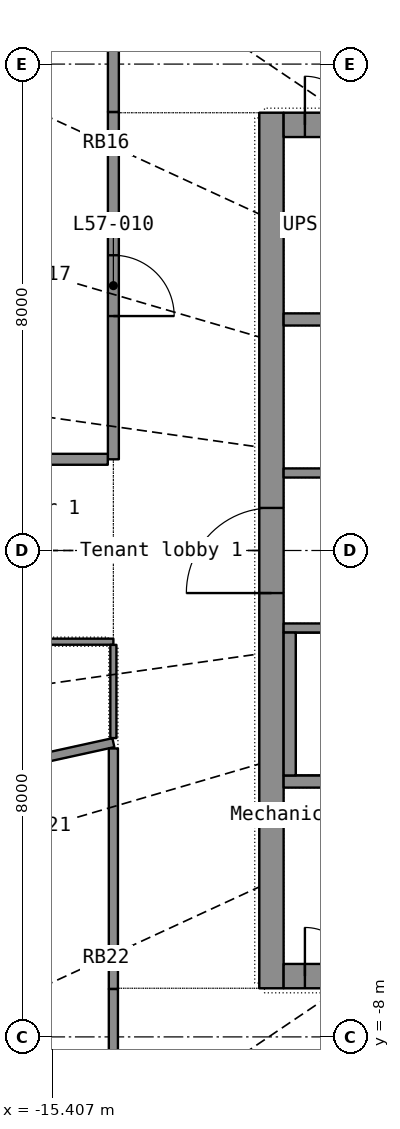
"""IFC4 building model, lengths in metres.
Left out: names, types, materials, properties, quantities, classifications, styles, units other than length and angle.
Written with IfcOpenShell. Run it as: python <this file> out.ifc"""

import sys

from ifc_helpers import new_model, si_unit, direction, frame, frame_2d, origin, place, context, subcontext, project, spatial, rectangle, extrude, element, fill, save


model = new_model("IFC4")
c1 = context("Model", 3, precision=1e-05, world=origin(), true_north=direction((0.0, 1.0)))
c2 = subcontext(c1, "Body", "Model", "MODEL_VIEW")
j1 = project(units=[si_unit("LENGTHUNIT", "METRE"), si_unit("PLANEANGLEUNIT", "RADIAN")], contexts=[c1])
p1 = place(None, origin())
s1 = spatial("IfcSite", under=j1, at=p1, CompositionType="ELEMENT")
p2 = place(p1, origin())
s2 = spatial("IfcBuilding", under=s1, at=p2, CompositionType="ELEMENT")
p3 = place(p2, frame((0.0, 0.0, 235.6)))
s3 = spatial("IfcBuildingStorey", under=s2, at=p3, CompositionType="ELEMENT", Elevation=235.6)
p4 = place(p3, frame((-11.8, -7.2, 0.0), z_axis=(0.0, 0.0, 1.0), x_axis=(0.0, 1.0, 0.0)))
e1 = element("IfcWall", 1, at=p4, inside=s3, PredefinedType="SHEAR", context=c2, shape_type="SweptSolid", body=[
    extrude(rectangle(XDim=14.4, YDim=0.4, at=frame_2d((7.2, 0.0))), origin(), (0.0, 0.0, 1.0), 3.3),
])
p5 = place(p4, frame((6.5, 0.0, 0.0)))
e2 = element("IfcOpeningElement", 2, at=p5, cuts=e1, PredefinedType="OPENING", context=c2, shape_type="SweptSolid", body=[
    extrude(rectangle(XDim=1.4, YDim=2.2, at=frame_2d((0.7, 1.1))), frame((0.0, 0.21, 0.0), z_axis=(0.0, -1.0, 0.0), x_axis=(1.0, 0.0, 0.0)), (0.0, 0.0, 1.0), 0.42),
])
p6 = place(p3, frame((-11.6, -7.0, 0.0), z_axis=(0.0, 0.0, 1.0), x_axis=(1.0, 0.0, 0.0)))
e3 = element("IfcWall", 3, at=p6, inside=s3, PredefinedType="SHEAR", context=c2, shape_type="SweptSolid", body=[
    extrude(rectangle(XDim=23.2, YDim=0.4, at=frame_2d((11.6, 0.0))), origin(), (0.0, 0.0, 1.0), 3.3),
])
p7 = place(p6, frame((20.05, 0.0, 0.0)))
e4 = element("IfcOpeningElement", 4, at=p7, cuts=e3, PredefinedType="OPENING", context=c2, shape_type="SweptSolid", body=[
    extrude(rectangle(XDim=1.1, YDim=2.2, at=frame_2d((0.55, 1.1))), frame((0.0, 0.21, 0.0), z_axis=(0.0, -1.0, 0.0), x_axis=(1.0, 0.0, 0.0)), (0.0, 0.0, 1.0), 0.42),
])
p8 = place(p6, frame((3.15, 0.0, 0.0)))
e5 = element("IfcOpeningElement", 5, at=p8, cuts=e3, PredefinedType="OPENING", context=c2, shape_type="SweptSolid", body=[
    extrude(rectangle(XDim=0.9, YDim=2.1, at=frame_2d((0.45, 1.05))), frame((0.0, 0.21, 0.0), z_axis=(0.0, -1.0, 0.0), x_axis=(1.0, 0.0, 0.0)), (0.0, 0.0, 1.0), 0.42),
])
p9 = place(p6, frame((7.15, 0.0, 0.0)))
e6 = element("IfcOpeningElement", 6, at=p9, cuts=e3, PredefinedType="OPENING", context=c2, shape_type="SweptSolid", body=[
    extrude(rectangle(XDim=0.9, YDim=2.1, at=frame_2d((0.45, 1.05))), frame((0.0, 0.21, 0.0), z_axis=(0.0, -1.0, 0.0), x_axis=(1.0, 0.0, 0.0)), (0.0, 0.0, 1.0), 0.42),
])
p10 = place(p6, frame((11.15, 0.0, 0.0)))
e7 = element("IfcOpeningElement", 7, at=p10, cuts=e3, PredefinedType="OPENING", context=c2, shape_type="SweptSolid", body=[
    extrude(rectangle(XDim=0.9, YDim=2.1, at=frame_2d((0.45, 1.05))), frame((0.0, 0.21, 0.0), z_axis=(0.0, -1.0, 0.0), x_axis=(1.0, 0.0, 0.0)), (0.0, 0.0, 1.0), 0.42),
])
p11 = place(p6, frame((16.15, 0.0, 0.0)))
e8 = element("IfcOpeningElement", 8, at=p11, cuts=e3, PredefinedType="OPENING", context=c2, shape_type="SweptSolid", body=[
    extrude(rectangle(XDim=0.9, YDim=2.1, at=frame_2d((0.45, 1.05))), frame((0.0, 0.21, 0.0), z_axis=(0.0, -1.0, 0.0), x_axis=(1.0, 0.0, 0.0)), (0.0, 0.0, 1.0), 0.42),
])
p12 = place(p6, frame((0.35, 0.0, 0.0)))
e9 = element("IfcOpeningElement", 9, at=p12, cuts=e3, PredefinedType="OPENING", context=c2, shape_type="SweptSolid", body=[
    extrude(rectangle(XDim=0.8, YDim=2.05, at=frame_2d((0.4, 1.025))), frame((0.0, 0.21, 0.0), z_axis=(0.0, -1.0, 0.0), x_axis=(1.0, 0.0, 0.0)), (0.0, 0.0, 1.0), 0.42),
])
p13 = place(p6, frame((22.05, 0.0, 0.0)))
e10 = element("IfcOpeningElement", 10, at=p13, cuts=e3, PredefinedType="OPENING", context=c2, shape_type="SweptSolid", body=[
    extrude(rectangle(XDim=0.8, YDim=2.05, at=frame_2d((0.4, 1.025))), frame((0.0, 0.21, 0.0), z_axis=(0.0, -1.0, 0.0), x_axis=(1.0, 0.0, 0.0)), (0.0, 0.0, 1.0), 0.42),
])
p14 = place(p3, frame((-11.6, 7.0, 0.0), z_axis=(0.0, 0.0, 1.0), x_axis=(1.0, 0.0, 0.0)))
e11 = element("IfcWall", 11, at=p14, inside=s3, PredefinedType="SHEAR", context=c2, shape_type="SweptSolid", body=[
    extrude(rectangle(XDim=23.2, YDim=0.4, at=frame_2d((11.6, 0.0))), origin(), (0.0, 0.0, 1.0), 3.3),
])
p15 = place(p14, frame((2.05, 0.0, 0.0)))
e12 = element("IfcOpeningElement", 12, at=p15, cuts=e11, PredefinedType="OPENING", context=c2, shape_type="SweptSolid", body=[
    extrude(rectangle(XDim=1.1, YDim=2.2, at=frame_2d((0.55, 1.1))), frame((0.0, 0.21, 0.0), z_axis=(0.0, -1.0, 0.0), x_axis=(1.0, 0.0, 0.0)), (0.0, 0.0, 1.0), 0.42),
])
p16 = place(p14, frame((6.05, 0.0, 0.0)))
e13 = element("IfcOpeningElement", 13, at=p16, cuts=e11, PredefinedType="OPENING", context=c2, shape_type="SweptSolid", body=[
    extrude(rectangle(XDim=1.1, YDim=2.2, at=frame_2d((0.55, 1.1))), frame((0.0, 0.21, 0.0), z_axis=(0.0, -1.0, 0.0), x_axis=(1.0, 0.0, 0.0)), (0.0, 0.0, 1.0), 0.42),
])
p17 = place(p14, frame((8.05, 0.0, 0.0)))
e14 = element("IfcOpeningElement", 14, at=p17, cuts=e11, PredefinedType="OPENING", context=c2, shape_type="SweptSolid", body=[
    extrude(rectangle(XDim=1.1, YDim=2.2, at=frame_2d((0.55, 1.1))), frame((0.0, 0.21, 0.0), z_axis=(0.0, -1.0, 0.0), x_axis=(1.0, 0.0, 0.0)), (0.0, 0.0, 1.0), 0.42),
])
p18 = place(p14, frame((10.05, 0.0, 0.0)))
e15 = element("IfcOpeningElement", 15, at=p18, cuts=e11, PredefinedType="OPENING", context=c2, shape_type="SweptSolid", body=[
    extrude(rectangle(XDim=1.1, YDim=2.2, at=frame_2d((0.55, 1.1))), frame((0.0, 0.21, 0.0), z_axis=(0.0, -1.0, 0.0), x_axis=(1.0, 0.0, 0.0)), (0.0, 0.0, 1.0), 0.42),
])
p19 = place(p14, frame((12.05, 0.0, 0.0)))
e16 = element("IfcOpeningElement", 16, at=p19, cuts=e11, PredefinedType="OPENING", context=c2, shape_type="SweptSolid", body=[
    extrude(rectangle(XDim=1.1, YDim=2.2, at=frame_2d((0.55, 1.1))), frame((0.0, 0.21, 0.0), z_axis=(0.0, -1.0, 0.0), x_axis=(1.0, 0.0, 0.0)), (0.0, 0.0, 1.0), 0.42),
])
p20 = place(p14, frame((14.05, 0.0, 0.0)))
e17 = element("IfcOpeningElement", 17, at=p20, cuts=e11, PredefinedType="OPENING", context=c2, shape_type="SweptSolid", body=[
    extrude(rectangle(XDim=1.1, YDim=2.2, at=frame_2d((0.55, 1.1))), frame((0.0, 0.21, 0.0), z_axis=(0.0, -1.0, 0.0), x_axis=(1.0, 0.0, 0.0)), (0.0, 0.0, 1.0), 0.42),
])
p21 = place(p14, frame((16.05, 0.0, 0.0)))
e18 = element("IfcOpeningElement", 18, at=p21, cuts=e11, PredefinedType="OPENING", context=c2, shape_type="SweptSolid", body=[
    extrude(rectangle(XDim=1.1, YDim=2.2, at=frame_2d((0.55, 1.1))), frame((0.0, 0.21, 0.0), z_axis=(0.0, -1.0, 0.0), x_axis=(1.0, 0.0, 0.0)), (0.0, 0.0, 1.0), 0.42),
])
p22 = place(p14, frame((18.05, 0.0, 0.0)))
e19 = element("IfcOpeningElement", 19, at=p22, cuts=e11, PredefinedType="OPENING", context=c2, shape_type="SweptSolid", body=[
    extrude(rectangle(XDim=1.1, YDim=2.2, at=frame_2d((0.55, 1.1))), frame((0.0, 0.21, 0.0), z_axis=(0.0, -1.0, 0.0), x_axis=(1.0, 0.0, 0.0)), (0.0, 0.0, 1.0), 0.42),
])
p23 = place(p14, frame((20.05, 0.0, 0.0)))
e20 = element("IfcOpeningElement", 20, at=p23, cuts=e11, PredefinedType="OPENING", context=c2, shape_type="SweptSolid", body=[
    extrude(rectangle(XDim=1.1, YDim=2.2, at=frame_2d((0.55, 1.1))), frame((0.0, 0.21, 0.0), z_axis=(0.0, -1.0, 0.0), x_axis=(1.0, 0.0, 0.0)), (0.0, 0.0, 1.0), 0.42),
])
p24 = place(p14, frame((4.15, 0.0, 0.0)))
e21 = element("IfcOpeningElement", 21, at=p24, cuts=e11, PredefinedType="OPENING", context=c2, shape_type="SweptSolid", body=[
    extrude(rectangle(XDim=0.9, YDim=2.1, at=frame_2d((0.45, 1.05))), frame((0.0, 0.21, 0.0), z_axis=(0.0, -1.0, 0.0), x_axis=(1.0, 0.0, 0.0)), (0.0, 0.0, 1.0), 0.42),
])
p25 = place(p14, frame((0.35, 0.0, 0.0)))
e22 = element("IfcOpeningElement", 22, at=p25, cuts=e11, PredefinedType="OPENING", context=c2, shape_type="SweptSolid", body=[
    extrude(rectangle(XDim=0.8, YDim=2.05, at=frame_2d((0.4, 1.025))), frame((0.0, 0.21, 0.0), z_axis=(0.0, -1.0, 0.0), x_axis=(1.0, 0.0, 0.0)), (0.0, 0.0, 1.0), 0.42),
])
p26 = place(p14, frame((22.05, 0.0, 0.0)))
e23 = element("IfcOpeningElement", 23, at=p26, cuts=e11, PredefinedType="OPENING", context=c2, shape_type="SweptSolid", body=[
    extrude(rectangle(XDim=0.8, YDim=2.05, at=frame_2d((0.4, 1.025))), frame((0.0, 0.21, 0.0), z_axis=(0.0, -1.0, 0.0), x_axis=(1.0, 0.0, 0.0)), (0.0, 0.0, 1.0), 0.42),
])
for number, where, z_axis, x_axis in (
    (24, (-11.6, -3.8, 0.0), (0.0, 0.0, 1.0), (1.0, 0.0, 0.0)),
    (25, (-11.6, 3.8, 0.0), (0.0, 0.0, 1.0), (1.0, 0.0, 0.0)),
):
    element("IfcWall", number, at=place(p3, frame(where, z_axis=z_axis, x_axis=x_axis)), inside=s3, PredefinedType="SHEAR", context=c2, shape_type="SweptSolid", body=[
        extrude(rectangle(XDim=23.2, YDim=0.2, at=frame_2d((11.6, 0.0))), origin(), (0.0, 0.0, 1.0), 3.3),
    ])
p27 = place(p3, frame((-11.6, -1.275, 0.0), z_axis=(0.0, 0.0, 1.0), x_axis=(1.0, 0.0, 0.0)))
e26 = element("IfcWall", 26, at=p27, inside=s3, PredefinedType="SHEAR", context=c2, shape_type="SweptSolid", body=[
    extrude(rectangle(XDim=8.6, YDim=0.15, at=frame_2d((4.3, 0.0))), origin(), (0.0, 0.0, 1.0), 3.3),
])
p28 = place(p27, frame((5.45, 0.0, 0.0)))
e27 = element("IfcOpeningElement", 27, at=p28, cuts=e26, PredefinedType="OPENING", context=c2, shape_type="SweptSolid", body=[
    extrude(rectangle(XDim=1.1, YDim=2.15, at=frame_2d((0.55, 1.075))), frame((0.0, 0.085, 0.0), z_axis=(0.0, -1.0, 0.0), x_axis=(1.0, 0.0, 0.0)), (0.0, 0.0, 1.0), 0.17),
])
p29 = place(p27, frame((7.25, 0.0, 0.0)))
e28 = element("IfcOpeningElement", 28, at=p29, cuts=e26, PredefinedType="OPENING", context=c2, shape_type="SweptSolid", body=[
    extrude(rectangle(XDim=0.9, YDim=2.1, at=frame_2d((0.45, 1.05))), frame((0.0, 0.085, 0.0), z_axis=(0.0, -1.0, 0.0), x_axis=(1.0, 0.0, 0.0)), (0.0, 0.0, 1.0), 0.17),
])
p30 = place(p3, frame((-11.6, 1.275, 0.0), z_axis=(0.0, 0.0, 1.0), x_axis=(1.0, 0.0, 0.0)))
e29 = element("IfcWall", 29, at=p30, inside=s3, PredefinedType="PARTITIONING", context=c2, shape_type="SweptSolid", body=[
    extrude(rectangle(XDim=8.6, YDim=0.15, at=frame_2d((4.3, 0.0))), origin(), (0.0, 0.0, 1.0), 3.3),
])
p31 = place(p30, frame((1.318, 0.0, 0.0)))
e30 = element("IfcOpeningElement", 30, at=p31, cuts=e29, PredefinedType="OPENING", context=c2, shape_type="SweptSolid", body=[
    extrude(rectangle(XDim=0.85, YDim=2.1, at=frame_2d((0.425, 1.05))), frame((0.0, 0.085, 0.0), z_axis=(0.0, -1.0, 0.0), x_axis=(1.0, 0.0, 0.0)), (0.0, 0.0, 1.0), 0.17),
])
p32 = place(p30, frame((4.456, 0.0, 0.0)))
e31 = element("IfcOpeningElement", 31, at=p32, cuts=e29, PredefinedType="OPENING", context=c2, shape_type="SweptSolid", body=[
    extrude(rectangle(XDim=0.85, YDim=2.1, at=frame_2d((0.425, 1.05))), frame((0.0, 0.085, 0.0), z_axis=(0.0, -1.0, 0.0), x_axis=(1.0, 0.0, 0.0)), (0.0, 0.0, 1.0), 0.17),
])
p33 = place(p30, frame((6.988, 0.0, 0.0)))
e32 = element("IfcOpeningElement", 32, at=p33, cuts=e29, PredefinedType="OPENING", context=c2, shape_type="SweptSolid", body=[
    extrude(rectangle(XDim=0.9, YDim=2.1, at=frame_2d((0.45, 1.05))), frame((0.0, 0.085, 0.0), z_axis=(0.0, -1.0, 0.0), x_axis=(1.0, 0.0, 0.0)), (0.0, 0.0, 1.0), 0.17),
])
p34 = place(p3, frame((-11.5, -3.7, 0.0), z_axis=(0.0, 0.0, 1.0), x_axis=(0.0, 1.0, 0.0)))
e33 = element("IfcWall", 33, at=p34, inside=s3, PredefinedType="SHEAR", context=c2, shape_type="SweptSolid", body=[
    extrude(rectangle(XDim=2.35, YDim=0.2, at=frame_2d((1.175, 0.0))), origin(), (0.0, 0.0, 1.0), 3.3),
])
p35 = place(p3, frame((-14.4, -3.161, 0.0), z_axis=(0.0, 0.0, 1.0), x_axis=(-0.976754355, -0.214361681, 0.0)))
e34 = element("IfcWall", 34, at=p35, inside=s3, PredefinedType="PARTITIONING", context=c2, shape_type="SweptSolid", body=[
    extrude(rectangle(XDim=6.352, YDim=0.15, at=frame_2d((3.176, 0.0))), origin(), (0.0, 0.0, 1.0), 2.4),
])
p36 = place(p3, frame((-14.4, 7.212, 0.0), z_axis=(0.0, 0.0, 1.0), x_axis=(0.0, -1.0, 0.0)))
e35 = element("IfcWall", 35, at=p36, inside=s3, PredefinedType="PARTITIONING", context=c2, shape_type="SweptSolid", body=[
    extrude(rectangle(XDim=5.712, YDim=0.18, at=frame_2d((2.856, 0.0))), origin(), (0.0, 0.0, 1.0), 2.4),
])
p37 = place(p36, frame((2.356, 0.0, 0.0)))
e36 = element("IfcOpeningElement", 36, at=p37, cuts=e35, PredefinedType="OPENING", context=c2, shape_type="SweptSolid", body=[
    extrude(rectangle(XDim=1.0, YDim=2.1, at=frame_2d((0.5, 1.05))), frame((0.0, 0.1, 0.0), z_axis=(0.0, -1.0, 0.0), x_axis=(1.0, 0.0, 0.0)), (0.0, 0.0, 1.0), 0.2),
])
p38 = place(p3, frame((-18.722, -1.5, 0.0), z_axis=(0.0, 0.0, 1.0), x_axis=(1.0, 0.0, 0.0)))
e37 = element("IfcWall", 37, at=p38, inside=s3, PredefinedType="PARTITIONING", context=c2, shape_type="SweptSolid", body=[
    extrude(rectangle(XDim=4.322, YDim=0.1, at=frame_2d((2.161, 0.0))), origin(), (0.0, 0.0, 1.0), 2.4),
])
p39 = place(p38, frame((1.686, 0.0, 0.0)))
e38 = element("IfcOpeningElement", 38, at=p39, cuts=e37, PredefinedType="OPENING", context=c2, shape_type="SweptSolid", body=[
    extrude(rectangle(XDim=0.95, YDim=2.15, at=frame_2d((0.475, 1.075))), frame((0.0, 0.06, 0.0), z_axis=(0.0, -1.0, 0.0), x_axis=(1.0, 0.0, 0.0)), (0.0, 0.0, 1.0), 0.12),
])
p40 = place(p3, frame((-14.492, 1.5, 0.0), z_axis=(0.0, 0.0, 1.0), x_axis=(-1.0, 0.0, 0.0)))
e39 = element("IfcWall", 39, at=p40, inside=s3, PredefinedType="PARTITIONING", context=c2, shape_type="SweptSolid", body=[
    extrude(rectangle(XDim=4.23, YDim=0.18, at=frame_2d((2.115, 0.0))), origin(), (0.0, 0.0, 1.0), 2.4),
])
p41 = place(p3, frame((-14.4, -3.256, 0.0), z_axis=(0.0, 0.0, 1.0), x_axis=(0.0, -1.0, 0.0)))
e40 = element("IfcWall", 40, at=p41, inside=s3, PredefinedType="PARTITIONING", context=c2, shape_type="SweptSolid", body=[
    extrude(rectangle(XDim=3.956, YDim=0.15, at=frame_2d((1.978, 0.0))), origin(), (0.0, 0.0, 1.0), 2.4),
])
p42 = place(p3, frame((-14.4, -7.213, 0.0), z_axis=(0.0, 0.0, 1.0), x_axis=(0.0, -1.0, 0.0)))
e41 = element("IfcWall", 41, at=p42, inside=s3, PredefinedType="PARTITIONING", context=c2, shape_type="SweptSolid", body=[
    extrude(rectangle(XDim=2.31, YDim=0.15, at=frame_2d((1.155, 0.0))), origin(), (0.0, 0.0, 1.0), 2.4),
])
p43 = place(p3, frame((-14.4, 9.508, 0.0), z_axis=(0.0, 0.0, 1.0), x_axis=(0.0, -1.0, 0.0)))
e42 = element("IfcWall", 42, at=p43, inside=s3, PredefinedType="PARTITIONING", context=c2, shape_type="SweptSolid", body=[
    extrude(rectangle(XDim=2.295, YDim=0.18, at=frame_2d((1.147, 0.0))), origin(), (0.0, 0.0, 1.0), 2.4),
])
p44 = place(p3, frame((-14.4, -1.552, 0.0), z_axis=(0.0, 0.0, 1.0), x_axis=(0.0, -1.0, 0.0)))
e43 = element("IfcWall", 43, at=p44, inside=s3, PredefinedType="PARTITIONING", context=c2, shape_type="SweptSolid", body=[
    extrude(rectangle(XDim=1.533, YDim=0.1, at=frame_2d((0.767, 0.0))), origin(), (0.0, 0.0, 1.0), 2.4),
])
p45 = place(p12, origin())
e44 = element("IfcDoor", 44, at=p45, inside=s3, OperationType="SINGLE_SWING_LEFT", PredefinedType="DOOR", context=c2, shape_type="SweptSolid", body=[
    extrude(rectangle(XDim=0.8, YDim=2.05, at=frame_2d((0.4, 1.025))), frame((0.0, 0.025, 0.0), z_axis=(0.0, -1.0, 0.0), x_axis=(1.0, 0.0, 0.0)), (0.0, 0.0, 1.0), 0.05),
])
fill(e9, e44)
p46 = place(p25, origin())
e45 = element("IfcDoor", 45, at=p46, inside=s3, OperationType="SINGLE_SWING_LEFT", PredefinedType="DOOR", context=c2, shape_type="SweptSolid", body=[
    extrude(rectangle(XDim=0.8, YDim=2.05, at=frame_2d((0.4, 1.025))), frame((0.0, 0.025, 0.0), z_axis=(0.0, -1.0, 0.0), x_axis=(1.0, 0.0, 0.0)), (0.0, 0.0, 1.0), 0.05),
])
fill(e22, e45)
p47 = place(p5, origin())
e46 = element("IfcDoor", 46, at=p47, inside=s3, OperationType="DOUBLE_DOOR_SINGLE_SWING", PredefinedType="DOOR", context=c2, shape_type="SweptSolid", body=[
    extrude(rectangle(XDim=1.4, YDim=2.2, at=frame_2d((0.7, 1.1))), frame((0.0, 0.025, 0.0), z_axis=(0.0, -1.0, 0.0), x_axis=(1.0, 0.0, 0.0)), (0.0, 0.0, 1.0), 0.05),
])
fill(e2, e46)
p48 = place(p37, origin())
e47 = element("IfcDoor", 47, at=p48, inside=s3, OperationType="SINGLE_SWING_RIGHT", PredefinedType="DOOR", context=c2, shape_type="SweptSolid", body=[
    extrude(rectangle(XDim=1.0, YDim=2.1, at=frame_2d((0.5, 1.05))), frame((0.0, 0.025, 0.0), z_axis=(0.0, -1.0, 0.0), x_axis=(1.0, 0.0, 0.0)), (0.0, 0.0, 1.0), 0.05),
])
fill(e36, e47)
save(model, sys.argv[1])
